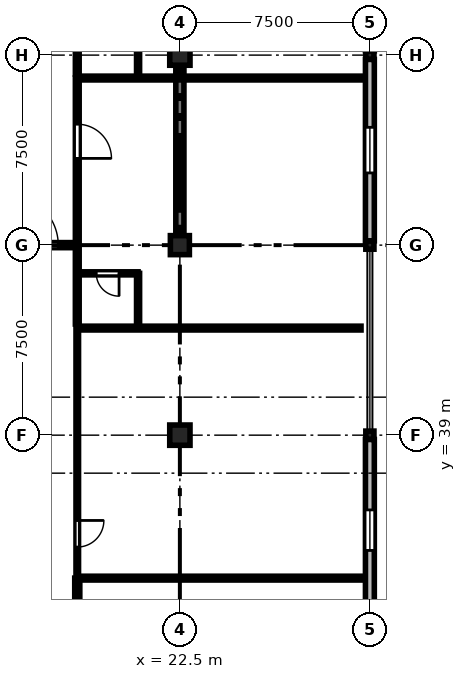
"""IFC4 building model, lengths in metres.
Left out: names, types, materials, properties, quantities, classifications, styles, units other than length and angle.
Written with IfcOpenShell. Run it as: python <this file> out.ifc"""

import sys

from ifc_helpers import new_model, si_unit, direction, frame, frame_2d, origin, origin_2d, place, context, subcontext, project, spatial, rectangle, circle, extrude, element, fill, save


model = new_model("IFC4")
c1 = context("Model", 3, precision=1e-05, world=origin(), true_north=direction((0.0, 1.0)))
c2 = subcontext(c1, "Body", "Model", "MODEL_VIEW")
j1 = project(units=[si_unit("LENGTHUNIT", "METRE"), si_unit("PLANEANGLEUNIT", "RADIAN")], contexts=[c1])
p1 = place(None, origin())
s1 = spatial("IfcSite", under=j1, at=p1, CompositionType="ELEMENT")
p2 = place(p1, origin())
s2 = spatial("IfcBuilding", under=s1, at=p2, CompositionType="ELEMENT")
p3 = place(p2, frame((0.0, 0.0, 9.3)))
s3 = spatial("IfcBuildingStorey", under=s2, at=p3, CompositionType="ELEMENT", Elevation=9.3)
p4 = place(p3, frame((22.5, 39.0, 0.0), z_axis=(0.0, 0.0, 1.0), x_axis=(1.0, 0.0, 0.0)))
e1 = element("IfcColumn", 1, at=p4, inside=s3, PredefinedType="COLUMN", context=c2, shape_type="SweptSolid", body=[
    extrude(rectangle(XDim=0.8, YDim=0.8, at=origin_2d()), origin(), (0.0, 0.0, 1.0), 4.8),
])
p5 = place(p3, frame((22.5, 46.5, 0.0), z_axis=(0.0, 0.0, 1.0), x_axis=(1.0, 0.0, 0.0)))
e2 = element("IfcColumn", 2, at=p5, inside=s3, PredefinedType="COLUMN", context=c2, shape_type="SweptSolid", body=[
    extrude(circle(Radius=0.375, at=origin_2d()), origin(), (0.0, 0.0, 1.0), 4.8),
])
p6 = place(p3, frame((22.5, 54.0, 0.0), z_axis=(0.0, 0.0, 1.0), x_axis=(1.0, 0.0, 0.0)))
e3 = element("IfcColumn", 3, at=p6, inside=s3, PredefinedType="COLUMN", context=c2, shape_type="SweptSolid", body=[
    extrude(rectangle(XDim=0.8, YDim=0.8, at=origin_2d()), origin(), (0.0, 0.0, 1.0), 4.8),
])
for number, where, z_axis, x_axis in (
    (4, (30.0, 39.0, 0.0), (0.0, 0.0, 1.0), (1.0, 0.0, 0.0)),
    (5, (30.0, 46.5, 0.0), (0.0, 0.0, 1.0), (1.0, 0.0, 0.0)),
    (6, (30.0, 54.0, 0.0), (0.0, 0.0, 1.0), (1.0, 0.0, 0.0)),
):
    element("IfcColumn", number, at=place(p3, frame(where, z_axis=z_axis, x_axis=x_axis)), inside=s3, PredefinedType="COLUMN", context=c2, shape_type="SweptSolid", body=[
        extrude(rectangle(XDim=0.32, YDim=0.32, at=origin_2d()), origin(), (0.0, 0.0, 1.0), 4.8),
    ])
p7 = place(p3, frame((22.5, 46.95, 0.0), z_axis=(0.0, 0.0, 1.0), x_axis=(0.0, 1.0, 0.0)))
e7 = element("IfcWall", 7, at=p7, inside=s3, PredefinedType="SHEAR", context=c2, shape_type="SweptSolid", body=[
    extrude(rectangle(XDim=6.6, YDim=0.32, at=frame_2d((3.3, 0.0))), origin(), (0.0, 0.0, 1.0), 4.0),
])
p8 = place(p3, frame((30.0, 38.83, 0.0), z_axis=(0.0, 0.0, 1.0), x_axis=(0.0, -1.0, 0.0)))
e8 = element("IfcWall", 8, at=p8, inside=s3, PredefinedType="STANDARD", context=c2, shape_type="SweptSolid", body=[
    extrude(rectangle(XDim=7.16, YDim=0.35, at=frame_2d((3.58, 0.0))), origin(), (0.0, 0.0, 1.0), 3.95),
])
p9 = place(p8, frame((2.78, 0.0, 0.9)))
e9 = element("IfcOpeningElement", 9, at=p9, cuts=e8, PredefinedType="OPENING", context=c2, shape_type="SweptSolid", body=[
    extrude(rectangle(XDim=1.6, YDim=1.8, at=frame_2d((0.8, 0.9))), frame((0.0, 0.185, 0.0), z_axis=(0.0, -1.0, 0.0), x_axis=(1.0, 0.0, 0.0)), (0.0, 0.0, 1.0), 0.37),
])
p10 = place(p3, frame((30.0, 53.83, 0.0), z_axis=(0.0, 0.0, 1.0), x_axis=(0.0, -1.0, 0.0)))
e10 = element("IfcWall", 10, at=p10, inside=s3, PredefinedType="STANDARD", context=c2, shape_type="SweptSolid", body=[
    extrude(rectangle(XDim=7.16, YDim=0.35, at=frame_2d((3.58, 0.0))), origin(), (0.0, 0.0, 1.0), 3.95),
])
p11 = place(p10, frame((2.68, 0.0, 0.9)))
e11 = element("IfcOpeningElement", 11, at=p11, cuts=e10, PredefinedType="OPENING", context=c2, shape_type="SweptSolid", body=[
    extrude(rectangle(XDim=1.8, YDim=2.4, at=frame_2d((0.9, 1.2))), frame((0.0, 0.185, 0.0), z_axis=(0.0, -1.0, 0.0), x_axis=(1.0, 0.0, 0.0)), (0.0, 0.0, 1.0), 0.37),
])
p12 = place(p3, frame((18.45, 33.357, 0.0), z_axis=(0.0, 0.0, 1.0), x_axis=(0.0, -1.0, 0.0)))
e12 = element("IfcWall", 12, at=p12, inside=s3, PredefinedType="STANDARD", context=c2, shape_type="SweptSolid", body=[
    extrude(rectangle(XDim=9.709, YDim=0.2, at=frame_2d((4.854, 0.0))), origin(), (0.0, 0.0, 1.0), 4.135),
])
p13 = place(p12, frame((5.891, 0.0, 0.0)))
e13 = element("IfcOpeningElement", 13, at=p13, cuts=e12, PredefinedType="OPENING", context=c2, shape_type="SweptSolid", body=[
    extrude(rectangle(XDim=1.15, YDim=2.2, at=frame_2d((0.575, 1.1))), frame((0.0, 0.11, 0.0), z_axis=(0.0, -1.0, 0.0), x_axis=(1.0, 0.0, 0.0)), (0.0, 0.0, 1.0), 0.22),
])
p14 = place(p3, frame((18.45, 43.226, 0.0), z_axis=(0.0, 0.0, 1.0), x_axis=(0.0, -1.0, 0.0)))
e14 = element("IfcWall", 14, at=p14, inside=s3, PredefinedType="PARTITIONING", context=c2, shape_type="SweptSolid", body=[
    extrude(rectangle(XDim=9.709, YDim=0.1, at=frame_2d((4.854, 0.0))), origin(), (0.0, 0.0, 1.0), 4.535),
])
p15 = place(p14, frame((7.593, 0.0, 0.0)))
e15 = element("IfcOpeningElement", 15, at=p15, cuts=e14, PredefinedType="OPENING", context=c2, shape_type="SweptSolid", body=[
    extrude(rectangle(XDim=1.05, YDim=2.2, at=frame_2d((0.525, 1.1))), frame((0.0, 0.06, 0.0), z_axis=(0.0, -1.0, 0.0), x_axis=(1.0, 0.0, 0.0)), (0.0, 0.0, 1.0), 0.12),
])
p16 = place(p3, frame((18.45, 53.095, 0.0), z_axis=(0.0, 0.0, 1.0), x_axis=(0.0, -1.0, 0.0)))
e16 = element("IfcWall", 16, at=p16, inside=s3, PredefinedType="PARTITIONING", context=c2, shape_type="SweptSolid", body=[
    extrude(rectangle(XDim=9.709, YDim=0.15, at=frame_2d((4.854, 0.0))), origin(), (0.0, 0.0, 1.0), 4.535),
])
p17 = place(p16, frame((1.822, 0.0, 0.0)))
e17 = element("IfcOpeningElement", 17, at=p17, cuts=e16, PredefinedType="OPENING", context=c2, shape_type="SweptSolid", body=[
    extrude(rectangle(XDim=1.35, YDim=2.25, at=frame_2d((0.675, 1.125))), frame((0.0, 0.085, 0.0), z_axis=(0.0, -1.0, 0.0), x_axis=(1.0, 0.0, 0.0)), (0.0, 0.0, 1.0), 0.17),
])
p18 = place(p3, frame((20.85, 45.386, 0.0), z_axis=(0.0, 0.0, 1.0), x_axis=(-1.0, 0.0, 0.0)))
e18 = element("IfcWall", 18, at=p18, inside=s3, PredefinedType="PARTITIONING", context=c2, shape_type="SweptSolid", body=[
    extrude(rectangle(XDim=2.4, YDim=0.12, at=frame_2d((1.2, 0.0))), origin(), (0.0, 0.0, 1.0), 4.535),
])
p19 = place(p18, frame((0.75, 0.0, 0.0)))
e19 = element("IfcOpeningElement", 19, at=p19, cuts=e18, PredefinedType="OPENING", context=c2, shape_type="SweptSolid", body=[
    extrude(rectangle(XDim=0.9, YDim=2.1, at=frame_2d((0.45, 1.05))), frame((0.0, 0.07, 0.0), z_axis=(0.0, -1.0, 0.0), x_axis=(1.0, 0.0, 0.0)), (0.0, 0.0, 1.0), 0.14),
])
p20 = place(p3, frame((20.85, 43.386, 0.0), z_axis=(0.0, 0.0, 1.0), x_axis=(0.0, 1.0, 0.0)))
e20 = element("IfcWall", 20, at=p20, inside=s3, PredefinedType="PARTITIONING", context=c2, shape_type="SweptSolid", body=[
    extrude(rectangle(XDim=2.0, YDim=0.12, at=frame_2d((1.0, 0.0))), origin(), (0.0, 0.0, 1.0), 4.535),
])
p21 = place(p3, frame((18.45, 62.964, 0.0), z_axis=(0.0, 0.0, 1.0), x_axis=(0.0, -1.0, 0.0)))
e21 = element("IfcWall", 21, at=p21, inside=s3, PredefinedType="PARTITIONING", context=c2, shape_type="SweptSolid", body=[
    extrude(rectangle(XDim=9.709, YDim=0.15, at=frame_2d((4.854, 0.0))), origin(), (0.0, 0.0, 1.0), 4.535),
])
p22 = place(p21, frame((4.179, 0.0, 0.0)))
e22 = element("IfcOpeningElement", 22, at=p22, cuts=e21, PredefinedType="OPENING", context=c2, shape_type="SweptSolid", body=[
    extrude(rectangle(XDim=1.35, YDim=2.25, at=frame_2d((0.675, 1.125))), frame((0.0, 0.085, 0.0), z_axis=(0.0, -1.0, 0.0), x_axis=(1.0, 0.0, 0.0)), (0.0, 0.0, 1.0), 0.17),
])
p23 = place(p3, frame((20.85, 53.255, 0.0), z_axis=(0.0, 0.0, 1.0), x_axis=(0.0, 1.0, 0.0)))
e23 = element("IfcWall", 23, at=p23, inside=s3, PredefinedType="PARTITIONING", context=c2, shape_type="SweptSolid", body=[
    extrude(rectangle(XDim=2.0, YDim=0.12, at=frame_2d((1.0, 0.0))), origin(), (0.0, 0.0, 1.0), 4.535),
])
for number, where, z_axis, x_axis in (
    (24, (18.45, 33.357, 0.0), (0.0, 0.0, 1.0), (1.0, 0.0, 0.0)),
    (25, (18.45, 43.226, 0.0), (0.0, 0.0, 1.0), (1.0, 0.0, 0.0)),
    (26, (18.45, 53.095, 0.0), (0.0, 0.0, 1.0), (1.0, 0.0, 0.0)),
):
    element("IfcWall", number, at=place(p3, frame(where, z_axis=z_axis, x_axis=x_axis)), inside=s3, PredefinedType="PARTITIONING", context=c2, shape_type="SweptSolid", body=[
        extrude(rectangle(XDim=11.2, YDim=0.15, at=frame_2d((5.6, 0.0))), origin(), (0.0, 0.0, 1.0), 4.535),
    ])
p24 = place(p3, frame((15.2, 46.5, 0.0), z_axis=(0.0, 0.0, 1.0), x_axis=(1.0, 0.0, 0.0)))
e27 = element("IfcWall", 27, at=p24, inside=s3, PredefinedType="STANDARD", context=c2, shape_type="SweptSolid", body=[
    extrude(rectangle(XDim=3.0, YDim=0.2, at=frame_2d((1.5, 0.0))), origin(), (0.0, 0.0, 1.0), 3.985),
])
p25 = place(p24, frame((0.5, 0.0, 0.0)))
e28 = element("IfcOpeningElement", 28, at=p25, cuts=e27, PredefinedType="OPENING", context=c2, shape_type="SweptSolid", body=[
    extrude(rectangle(XDim=2.0, YDim=2.3, at=frame_2d((1.0, 1.15))), frame((0.0, 0.11, 0.0), z_axis=(0.0, -1.0, 0.0), x_axis=(1.0, 0.0, 0.0)), (0.0, 0.0, 1.0), 0.22),
])
p26 = place(p9, origin())
e29 = element("IfcWindow", 29, at=p26, inside=s3, PartitioningType="SINGLE_PANEL", PredefinedType="WINDOW", context=c2, shape_type="SweptSolid", body=[
    extrude(rectangle(XDim=1.6, YDim=1.8, at=frame_2d((0.8, 0.9))), frame((0.0, 0.03, 0.0), z_axis=(0.0, -1.0, 0.0), x_axis=(1.0, 0.0, 0.0)), (0.0, 0.0, 1.0), 0.06),
])
fill(e9, e29)
p27 = place(p11, origin())
e30 = element("IfcWindow", 30, at=p27, inside=s3, PartitioningType="SINGLE_PANEL", PredefinedType="WINDOW", context=c2, shape_type="SweptSolid", body=[
    extrude(rectangle(XDim=1.8, YDim=2.4, at=frame_2d((0.9, 1.2))), frame((0.0, 0.03, 0.0), z_axis=(0.0, -1.0, 0.0), x_axis=(1.0, 0.0, 0.0)), (0.0, 0.0, 1.0), 0.06),
])
fill(e11, e30)
p28 = place(p15, origin())
e31 = element("IfcDoor", 31, at=p28, inside=s3, OperationType="SINGLE_SWING_LEFT", PredefinedType="DOOR", context=c2, shape_type="SweptSolid", body=[
    extrude(rectangle(XDim=1.05, YDim=2.2, at=frame_2d((0.525, 1.1))), frame((0.0, 0.025, 0.0), z_axis=(0.0, -1.0, 0.0), x_axis=(1.0, 0.0, 0.0)), (0.0, 0.0, 1.0), 0.05),
])
fill(e15, e31)
p29 = place(p17, origin())
e32 = element("IfcDoor", 32, at=p29, inside=s3, OperationType="SINGLE_SWING_RIGHT", PredefinedType="DOOR", context=c2, shape_type="SweptSolid", body=[
    extrude(rectangle(XDim=1.35, YDim=2.25, at=frame_2d((0.675, 1.125))), frame((0.0, 0.025, 0.0), z_axis=(0.0, -1.0, 0.0), x_axis=(1.0, 0.0, 0.0)), (0.0, 0.0, 1.0), 0.05),
])
fill(e17, e32)
p30 = place(p19, origin())
e33 = element("IfcDoor", 33, at=p30, inside=s3, OperationType="SINGLE_SWING_LEFT", PredefinedType="DOOR", context=c2, shape_type="SweptSolid", body=[
    extrude(rectangle(XDim=0.9, YDim=2.1, at=frame_2d((0.45, 1.05))), frame((0.0, 0.025, 0.0), z_axis=(0.0, -1.0, 0.0), x_axis=(1.0, 0.0, 0.0)), (0.0, 0.0, 1.0), 0.05),
])
fill(e19, e33)
p31 = place(p25, origin())
e34 = element("IfcDoor", 34, at=p31, inside=s3, OperationType="DOUBLE_DOOR_SINGLE_SWING", PredefinedType="DOOR", context=c2, shape_type="SweptSolid", body=[
    extrude(rectangle(XDim=2.0, YDim=2.3, at=frame_2d((1.0, 1.15))), frame((0.0, 0.025, 0.0), z_axis=(0.0, -1.0, 0.0), x_axis=(1.0, 0.0, 0.0)), (0.0, 0.0, 1.0), 0.05),
])
fill(e28, e34)
save(model, sys.argv[1])
